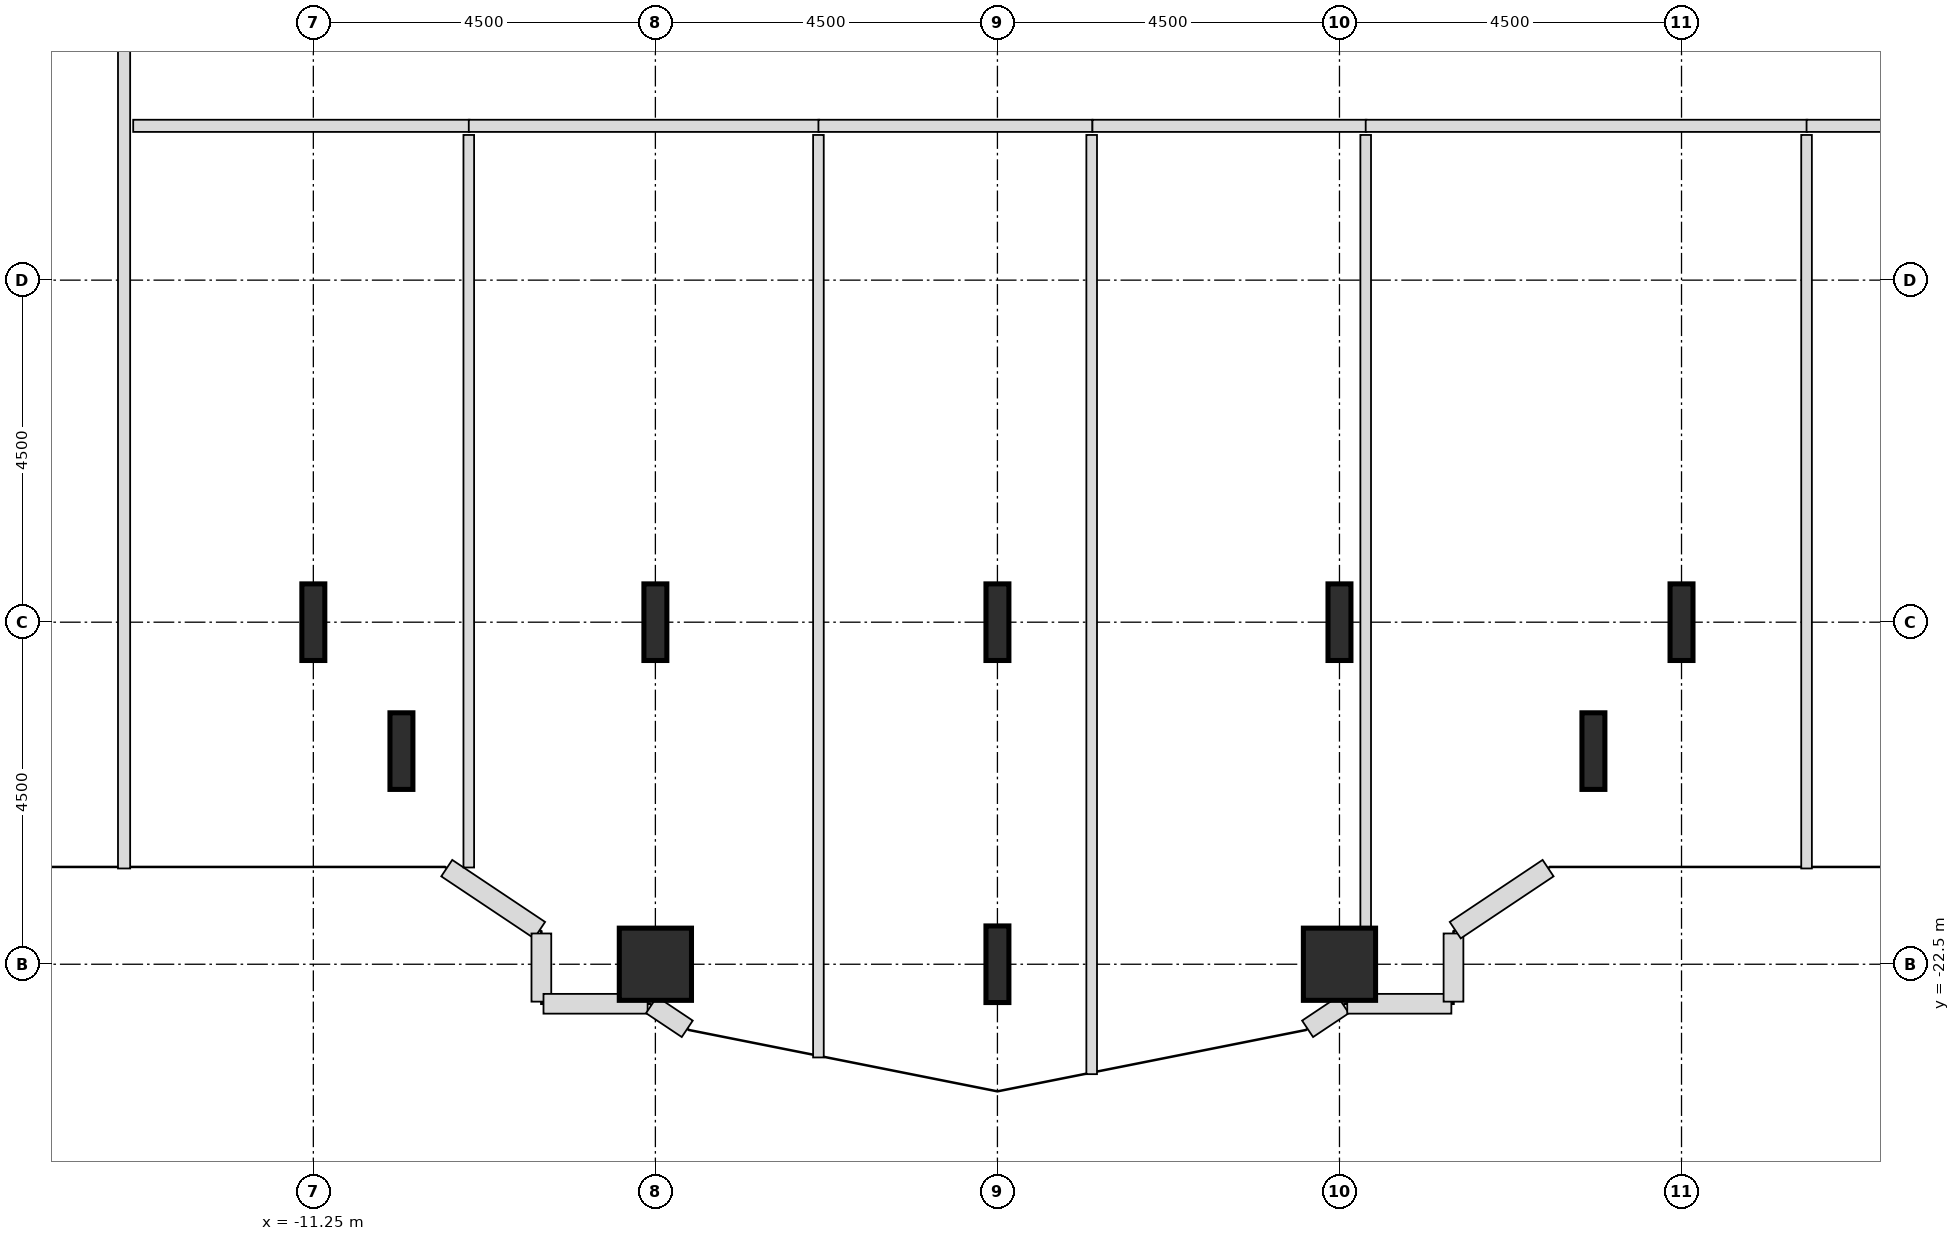
"""IFC4 building model, lengths in metres.
Left out: names, types, materials, properties, quantities, classifications, styles, units other than length and angle.
Written with IfcOpenShell. Run it as: python <this file> out.ifc"""

import sys

from ifc_helpers import new_model, si_unit, direction, frame, frame_2d, origin, origin_2d, place, context, subcontext, project, spatial, rectangle, hollow_rectangle, i_section, extrude, source, transform, mapped, element, fill, save


model = new_model("IFC4")
c1 = context("Model", 3, precision=1e-05, world=origin(), true_north=direction((0.0, 1.0)))
c2 = subcontext(c1, "Body", "Model", "MODEL_VIEW")
j1 = project(units=[si_unit("LENGTHUNIT", "METRE"), si_unit("PLANEANGLEUNIT", "RADIAN")], contexts=[c1])
p1 = place(None, origin())
s1 = spatial("IfcSite", under=j1, at=p1, CompositionType="ELEMENT")
p2 = place(p1, origin())
s2 = spatial("IfcBuilding", under=s1, at=p2, CompositionType="ELEMENT")
p3 = place(p2, frame((0.0, 0.0, 40.6)))
s3 = spatial("IfcBuildingStorey", under=s2, at=p3, CompositionType="ELEMENT", Elevation=40.6)
m1 = source(origin(), c2, "Body", "SweptSolid", [
    extrude(i_section(OverallWidth=0.302, OverallDepth=1.008, WebThickness=0.021, FlangeThickness=0.04, FilletRadius=0.03, at=origin_2d()), origin(), (0.0, 0.0, 1.0), 3.8),
])
for number, where, z_axis, x_axis in (
    (1, (-11.25, -18.0, 0.0), (0.0, 0.0, 1.0), (1.0, 0.0, 0.0)),
    (2, (-10.091, -19.696, 0.0), (0.0, 0.0, 1.0), (1.0, 0.0, 0.0)),
):
    element("IfcColumn", number, at=place(p3, frame(where, z_axis=z_axis, x_axis=x_axis)), inside=s3, PredefinedType="COLUMN", context=c2, shape_type="MappedRepresentation", body=[
        mapped(m1, transform((0.0, 0.0, 0.0), x_axis=(1.0, 0.0, 0.0), y_axis=(0.0, 1.0, 0.0), z_axis=(0.0, 0.0, 1.0), scale=1.0)),
    ])
m2 = source(origin(), c2, "Body", "SweptSolid", [
    extrude(hollow_rectangle(XDim=0.95, YDim=0.95, WallThickness=0.045, InnerFilletRadius=0.045, OuterFilletRadius=0.09, at=origin_2d()), origin(), (0.0, 0.0, 1.0), 3.8),
])
p4 = place(p3, frame((-6.75, -22.5, 0.0), z_axis=(0.0, 0.0, 1.0), x_axis=(1.0, 0.0, 0.0)))
e3 = element("IfcColumn", 3, at=p4, inside=s3, PredefinedType="COLUMN", context=c2, shape_type="MappedRepresentation", body=[
    mapped(m2, transform((0.0, 0.0, 0.0), x_axis=(1.0, 0.0, 0.0), y_axis=(0.0, 1.0, 0.0), z_axis=(0.0, 0.0, 1.0), scale=1.0)),
])
for number, where, z_axis, x_axis in (
    (4, (-6.75, -18.0, 0.0), (0.0, 0.0, 1.0), (1.0, 0.0, 0.0)),
    (5, (-2.25, -22.5, 0.0), (0.0, 0.0, 1.0), (1.0, 0.0, 0.0)),
    (6, (-2.25, -18.0, 0.0), (0.0, 0.0, 1.0), (1.0, 0.0, 0.0)),
):
    element("IfcColumn", number, at=place(p3, frame(where, z_axis=z_axis, x_axis=x_axis)), inside=s3, PredefinedType="COLUMN", context=c2, shape_type="MappedRepresentation", body=[
        mapped(m1, transform((0.0, 0.0, 0.0), x_axis=(1.0, 0.0, 0.0), y_axis=(0.0, 1.0, 0.0), z_axis=(0.0, 0.0, 1.0), scale=1.0)),
    ])
p5 = place(p3, frame((2.25, -22.5, 0.0), z_axis=(0.0, 0.0, 1.0), x_axis=(1.0, 0.0, 0.0)))
e7 = element("IfcColumn", 7, at=p5, inside=s3, PredefinedType="COLUMN", context=c2, shape_type="MappedRepresentation", body=[
    mapped(m2, transform((0.0, 0.0, 0.0), x_axis=(1.0, 0.0, 0.0), y_axis=(0.0, 1.0, 0.0), z_axis=(0.0, 0.0, 1.0), scale=1.0)),
])
for number, where, z_axis, x_axis in (
    (8, (2.25, -18.0, 0.0), (0.0, 0.0, 1.0), (1.0, 0.0, 0.0)),
    (9, (5.591, -19.696, 0.0), (0.0, 0.0, 1.0), (1.0, 0.0, 0.0)),
    (10, (6.75, -18.0, 0.0), (0.0, 0.0, 1.0), (1.0, 0.0, 0.0)),
):
    element("IfcColumn", number, at=place(p3, frame(where, z_axis=z_axis, x_axis=x_axis)), inside=s3, PredefinedType="COLUMN", context=c2, shape_type="MappedRepresentation", body=[
        mapped(m1, transform((0.0, 0.0, 0.0), x_axis=(1.0, 0.0, 0.0), y_axis=(0.0, 1.0, 0.0), z_axis=(0.0, 0.0, 1.0), scale=1.0)),
    ])
m3 = source(origin(), c2, "Body", "SweptSolid", [
    extrude(rectangle(XDim=1.469, YDim=0.26, at=frame_2d((0.734, 0.0))), origin(), (0.0, 0.0, 1.0), 3.55),
])
p6 = place(p3, frame((-9.495, -21.236, 0.0), z_axis=(0.0, 0.0, 1.0), x_axis=(0.831461760506, -0.555581983884, 0.0)))
e11 = element("IfcWall", 11, at=p6, inside=s3, PredefinedType="SOLIDWALL", context=c2, shape_type="MappedRepresentation", body=[
    mapped(m3, transform((0.0, 0.0, 0.0), x_axis=(1.0, 0.0, 0.0), y_axis=(0.0, 1.0, 0.0), z_axis=(0.0, 0.0, 1.0), scale=1.0)),
])
m4 = source(origin(), c2, "Body", "SweptSolid", [
    extrude(rectangle(XDim=0.897, YDim=0.26, at=frame_2d((0.448, 0.0))), origin(), (0.0, 0.0, 1.0), 3.55),
])
p7 = place(p3, frame((-8.25, -22.095, 0.0), z_axis=(0.0, 0.0, 1.0), x_axis=(0.0, -1.0, 0.0)))
e12 = element("IfcWall", 12, at=p7, inside=s3, PredefinedType="SOLIDWALL", context=c2, shape_type="MappedRepresentation", body=[
    mapped(m4, transform((0.0, 0.0, 0.0), x_axis=(1.0, 0.0, 0.0), y_axis=(0.0, 1.0, 0.0), z_axis=(0.0, 0.0, 1.0), scale=1.0)),
])
m5 = source(origin(), c2, "Body", "SweptSolid", [
    extrude(rectangle(XDim=1.37, YDim=0.26, at=frame_2d((0.685, 0.0))), origin(), (0.0, 0.0, 1.0), 3.55),
])
p8 = place(p3, frame((-8.222, -23.02, 0.0), z_axis=(0.0, 0.0, 1.0), x_axis=(1.0, 0.0, 0.0)))
e13 = element("IfcWall", 13, at=p8, inside=s3, PredefinedType="SOLIDWALL", context=c2, shape_type="MappedRepresentation", body=[
    mapped(m5, transform((0.0, 0.0, 0.0), x_axis=(1.0, 0.0, 0.0), y_axis=(0.0, 1.0, 0.0), z_axis=(0.0, 0.0, 1.0), scale=1.0)),
])
m6 = source(origin(), c2, "Body", "SweptSolid", [
    extrude(rectangle(XDim=0.565, YDim=0.26, at=frame_2d((0.283, 0.0))), origin(), (0.0, 0.0, 1.0), 3.55),
])
for number, where, z_axis, x_axis in (
    (14, (-6.801, -23.036, 0.0), (0.0, 0.0, 1.0), (0.832, -0.555, 0.0)),
    (15, (1.831, -23.35, 0.0), (0.0, 0.0, 1.0), (0.832, 0.555, 0.0)),
):
    element("IfcWall", number, at=place(p3, frame(where, z_axis=z_axis, x_axis=x_axis)), inside=s3, PredefinedType="SOLIDWALL", context=c2, shape_type="MappedRepresentation", body=[
        mapped(m6, transform((0.0, 0.0, 0.0), x_axis=(1.0, 0.0, 0.0), y_axis=(0.0, 1.0, 0.0), z_axis=(0.0, 0.0, 1.0), scale=1.0)),
    ])
p9 = place(p3, frame((2.352, -23.02, 0.0), z_axis=(0.0, 0.0, 1.0), x_axis=(1.0, 0.0, 0.0)))
e16 = element("IfcWall", 16, at=p9, inside=s3, PredefinedType="SOLIDWALL", context=c2, shape_type="MappedRepresentation", body=[
    mapped(m5, transform((0.0, 0.0, 0.0), x_axis=(1.0, 0.0, 0.0), y_axis=(0.0, 1.0, 0.0), z_axis=(0.0, 0.0, 1.0), scale=1.0)),
])
p10 = place(p3, frame((3.75, -22.992, 0.0), z_axis=(0.0, 0.0, 1.0), x_axis=(0.0, 1.0, 0.0)))
e17 = element("IfcWall", 17, at=p10, inside=s3, PredefinedType="SOLIDWALL", context=c2, shape_type="MappedRepresentation", body=[
    mapped(m4, transform((0.0, 0.0, 0.0), x_axis=(1.0, 0.0, 0.0), y_axis=(0.0, 1.0, 0.0), z_axis=(0.0, 0.0, 1.0), scale=1.0)),
])
p11 = place(p3, frame((3.773, -22.052, 0.0), z_axis=(0.0, 0.0, 1.0), x_axis=(0.831461760506, 0.555581983884, 0.0)))
e18 = element("IfcWall", 18, at=p11, inside=s3, PredefinedType="SOLIDWALL", context=c2, shape_type="MappedRepresentation", body=[
    mapped(m3, transform((0.0, 0.0, 0.0), x_axis=(1.0, 0.0, 0.0), y_axis=(0.0, 1.0, 0.0), z_axis=(0.0, 0.0, 1.0), scale=1.0)),
])
m7 = source(origin(), c2, "Body", "SweptSolid", [
    extrude(rectangle(XDim=13.045, YDim=0.16, at=frame_2d((6.522, 0.0))), origin(), (0.0, 0.0, 1.0), 3.535),
])
p12 = place(p3, frame((-13.74, -21.24, 0.0), z_axis=(0.0, 0.0, 1.0), x_axis=(0.0, 1.0, 0.0)))
e19 = element("IfcWall", 19, at=p12, inside=s3, PredefinedType="PARTITIONING", context=c2, shape_type="MappedRepresentation", body=[
    mapped(m7, transform((0.0, 0.0, 0.0), x_axis=(1.0, 0.0, 0.0), y_axis=(0.0, 1.0, 0.0), z_axis=(0.0, 0.0, 1.0), scale=1.0)),
])
p13 = place(p12, frame((10.913, 0.0, 0.0)))
e20 = element("IfcOpeningElement", 20, at=p13, cuts=e19, PredefinedType="OPENING", context=c2, shape_type="SweptSolid", body=[
    extrude(rectangle(XDim=0.95, YDim=2.1, at=frame_2d((0.475, 1.05))), frame((0.0, 0.09, 0.0), z_axis=(0.0, -1.0, 0.0), x_axis=(1.0, 0.0, 0.0)), (0.0, 0.0, 1.0), 0.18),
])
m8 = source(origin(), c2, "Body", "SweptSolid", [
    extrude(rectangle(XDim=4.425, YDim=0.16, at=frame_2d((2.212, 0.0))), origin(), (0.0, 0.0, 1.0), 3.535),
])
p14 = place(p3, frame((-13.62, -11.47, 0.0), z_axis=(0.0, 0.0, 1.0), x_axis=(1.0, 0.0, 0.0)))
e21 = element("IfcWall", 21, at=p14, inside=s3, PredefinedType="PARTITIONING", context=c2, shape_type="MappedRepresentation", body=[
    mapped(m8, transform((0.0, 0.0, 0.0), x_axis=(1.0, 0.0, 0.0), y_axis=(0.0, 1.0, 0.0), z_axis=(0.0, 0.0, 1.0), scale=1.0)),
])
p15 = place(p14, frame((1.738, 0.0, 0.0)))
e22 = element("IfcOpeningElement", 22, at=p15, cuts=e21, PredefinedType="OPENING", context=c2, shape_type="SweptSolid", body=[
    extrude(rectangle(XDim=0.95, YDim=2.1, at=frame_2d((0.475, 1.05))), frame((0.0, 0.09, 0.0), z_axis=(0.0, -1.0, 0.0), x_axis=(1.0, 0.0, 0.0)), (0.0, 0.0, 1.0), 0.18),
])
m9 = source(origin(), c2, "Body", "SweptSolid", [
    extrude(rectangle(XDim=9.637, YDim=0.14, at=frame_2d((4.818, 0.0))), origin(), (0.0, 0.0, 1.0), 3.535),
])
p16 = place(p3, frame((-9.205, -21.227, 0.0), z_axis=(0.0, 0.0, 1.0), x_axis=(0.0, 1.0, 0.0)))
e23 = element("IfcWall", 23, at=p16, inside=s3, PredefinedType="PARTITIONING", context=c2, shape_type="MappedRepresentation", body=[
    mapped(m9, transform((0.0, 0.0, 0.0), x_axis=(1.0, 0.0, 0.0), y_axis=(0.0, 1.0, 0.0), z_axis=(0.0, 0.0, 1.0), scale=1.0)),
])
m10 = source(origin(), c2, "Body", "SweptSolid", [
    extrude(rectangle(XDim=4.61, YDim=0.16, at=frame_2d((2.305, 0.0))), origin(), (0.0, 0.0, 1.0), 3.535),
])
p17 = place(p3, frame((-9.205, -11.47, 0.0), z_axis=(0.0, 0.0, 1.0), x_axis=(1.0, 0.0, 0.0)))
e24 = element("IfcWall", 24, at=p17, inside=s3, PredefinedType="PARTITIONING", context=c2, shape_type="MappedRepresentation", body=[
    mapped(m10, transform((0.0, 0.0, 0.0), x_axis=(1.0, 0.0, 0.0), y_axis=(0.0, 1.0, 0.0), z_axis=(0.0, 0.0, 1.0), scale=1.0)),
])
p18 = place(p17, frame((1.83, 0.0, 0.0)))
e25 = element("IfcOpeningElement", 25, at=p18, cuts=e24, PredefinedType="OPENING", context=c2, shape_type="SweptSolid", body=[
    extrude(rectangle(XDim=0.95, YDim=2.1, at=frame_2d((0.475, 1.05))), frame((0.0, 0.09, 0.0), z_axis=(0.0, -1.0, 0.0), x_axis=(1.0, 0.0, 0.0)), (0.0, 0.0, 1.0), 0.18),
])
m11 = source(origin(), c2, "Body", "SweptSolid", [
    extrude(rectangle(XDim=12.136, YDim=0.14, at=frame_2d((6.068, 0.0))), origin(), (0.0, 0.0, 1.0), 3.535),
])
p19 = place(p3, frame((-4.605, -23.726, 0.0), z_axis=(0.0, 0.0, 1.0), x_axis=(0.0, 1.0, 0.0)))
e26 = element("IfcWall", 26, at=p19, inside=s3, PredefinedType="PARTITIONING", context=c2, shape_type="MappedRepresentation", body=[
    mapped(m11, transform((0.0, 0.0, 0.0), x_axis=(1.0, 0.0, 0.0), y_axis=(0.0, 1.0, 0.0), z_axis=(0.0, 0.0, 1.0), scale=1.0)),
])
m12 = source(origin(), c2, "Body", "SweptSolid", [
    extrude(rectangle(XDim=3.605, YDim=0.16, at=frame_2d((1.802, 0.0))), origin(), (0.0, 0.0, 1.0), 3.535),
])
p20 = place(p3, frame((-4.605, -11.47, 0.0), z_axis=(0.0, 0.0, 1.0), x_axis=(1.0, 0.0, 0.0)))
e27 = element("IfcWall", 27, at=p20, inside=s3, PredefinedType="PARTITIONING", context=c2, shape_type="MappedRepresentation", body=[
    mapped(m12, transform((0.0, 0.0, 0.0), x_axis=(1.0, 0.0, 0.0), y_axis=(0.0, 1.0, 0.0), z_axis=(0.0, 0.0, 1.0), scale=1.0)),
])
p21 = place(p20, frame((1.327, 0.0, 0.0)))
e28 = element("IfcOpeningElement", 28, at=p21, cuts=e27, PredefinedType="OPENING", context=c2, shape_type="SweptSolid", body=[
    extrude(rectangle(XDim=0.95, YDim=2.1, at=frame_2d((0.475, 1.05))), frame((0.0, 0.09, 0.0), z_axis=(0.0, -1.0, 0.0), x_axis=(1.0, 0.0, 0.0)), (0.0, 0.0, 1.0), 0.18),
])
m13 = source(origin(), c2, "Body", "SweptSolid", [
    extrude(rectangle(XDim=12.356, YDim=0.14, at=frame_2d((6.178, 0.0))), origin(), (0.0, 0.0, 1.0), 3.535),
])
p22 = place(p3, frame((-1.01, -23.946, 0.0), z_axis=(0.0, 0.0, 1.0), x_axis=(0.0, 1.0, 0.0)))
e29 = element("IfcWall", 29, at=p22, inside=s3, PredefinedType="PARTITIONING", context=c2, shape_type="MappedRepresentation", body=[
    mapped(m13, transform((0.0, 0.0, 0.0), x_axis=(1.0, 0.0, 0.0), y_axis=(0.0, 1.0, 0.0), z_axis=(0.0, 0.0, 1.0), scale=1.0)),
])
p23 = place(p3, frame((-1.0, -11.47, 0.0), z_axis=(0.0, 0.0, 1.0), x_axis=(1.0, 0.0, 0.0)))
e30 = element("IfcWall", 30, at=p23, inside=s3, PredefinedType="PARTITIONING", context=c2, shape_type="MappedRepresentation", body=[
    mapped(m12, transform((0.0, 0.0, 0.0), x_axis=(1.0, 0.0, 0.0), y_axis=(0.0, 1.0, 0.0), z_axis=(0.0, 0.0, 1.0), scale=1.0)),
])
p24 = place(p23, frame((1.327, 0.0, 0.0)))
e31 = element("IfcOpeningElement", 31, at=p24, cuts=e30, PredefinedType="OPENING", context=c2, shape_type="SweptSolid", body=[
    extrude(rectangle(XDim=0.95, YDim=2.1, at=frame_2d((0.475, 1.05))), frame((0.0, 0.09, 0.0), z_axis=(0.0, -1.0, 0.0), x_axis=(1.0, 0.0, 0.0)), (0.0, 0.0, 1.0), 0.18),
])
m14 = source(origin(), c2, "Body", "SweptSolid", [
    extrude(rectangle(XDim=11.26, YDim=0.14, at=frame_2d((5.63, 0.0))), origin(), (0.0, 0.0, 1.0), 2.825),
])
p25 = place(p3, frame((2.595, -22.85, 0.0), z_axis=(0.0, 0.0, 1.0), x_axis=(0.0, 1.0, 0.0)))
e32 = element("IfcWall", 32, at=p25, inside=s3, PredefinedType="PARTITIONING", context=c2, shape_type="MappedRepresentation", body=[
    mapped(m14, transform((0.0, 0.0, 0.0), x_axis=(1.0, 0.0, 0.0), y_axis=(0.0, 1.0, 0.0), z_axis=(0.0, 0.0, 1.0), scale=1.0)),
])
m15 = source(origin(), c2, "Body", "SweptSolid", [
    extrude(rectangle(XDim=5.81, YDim=0.16, at=frame_2d((2.905, 0.0))), origin(), (0.0, 0.0, 1.0), 3.535),
])
p26 = place(p3, frame((2.595, -11.47, 0.0), z_axis=(0.0, 0.0, 1.0), x_axis=(1.0, 0.0, 0.0)))
e33 = element("IfcWall", 33, at=p26, inside=s3, PredefinedType="PARTITIONING", context=c2, shape_type="MappedRepresentation", body=[
    mapped(m15, transform((0.0, 0.0, 0.0), x_axis=(1.0, 0.0, 0.0), y_axis=(0.0, 1.0, 0.0), z_axis=(0.0, 0.0, 1.0), scale=1.0)),
])
p27 = place(p26, frame((2.43, 0.0, 0.0)))
e34 = element("IfcOpeningElement", 34, at=p27, cuts=e33, PredefinedType="OPENING", context=c2, shape_type="SweptSolid", body=[
    extrude(rectangle(XDim=0.95, YDim=2.1, at=frame_2d((0.475, 1.05))), frame((0.0, 0.09, 0.0), z_axis=(0.0, -1.0, 0.0), x_axis=(1.0, 0.0, 0.0)), (0.0, 0.0, 1.0), 0.18),
])
m16 = source(origin(), c2, "Body", "SweptSolid", [
    extrude(rectangle(XDim=9.65, YDim=0.14, at=frame_2d((4.825, 0.0))), origin(), (0.0, 0.0, 1.0), 3.535),
])
p28 = place(p3, frame((8.395, -21.24, 0.0), z_axis=(0.0, 0.0, 1.0), x_axis=(0.0, 1.0, 0.0)))
e35 = element("IfcWall", 35, at=p28, inside=s3, PredefinedType="PARTITIONING", context=c2, shape_type="MappedRepresentation", body=[
    mapped(m16, transform((0.0, 0.0, 0.0), x_axis=(1.0, 0.0, 0.0), y_axis=(0.0, 1.0, 0.0), z_axis=(0.0, 0.0, 1.0), scale=1.0)),
])
m17 = source(origin(), c2, "Body", "SweptSolid", [
    extrude(rectangle(XDim=5.225, YDim=0.16, at=frame_2d((2.613, 0.0))), origin(), (0.0, 0.0, 1.0), 3.535),
])
p29 = place(p3, frame((8.395, -11.47, 0.0), z_axis=(0.0, 0.0, 1.0), x_axis=(1.0, 0.0, 0.0)))
e36 = element("IfcWall", 36, at=p29, inside=s3, PredefinedType="PARTITIONING", context=c2, shape_type="MappedRepresentation", body=[
    mapped(m17, transform((0.0, 0.0, 0.0), x_axis=(1.0, 0.0, 0.0), y_axis=(0.0, 1.0, 0.0), z_axis=(0.0, 0.0, 1.0), scale=1.0)),
])
p30 = place(p29, frame((2.137, 0.0, 0.0)))
e37 = element("IfcOpeningElement", 37, at=p30, cuts=e36, PredefinedType="OPENING", context=c2, shape_type="SweptSolid", body=[
    extrude(rectangle(XDim=0.95, YDim=2.1, at=frame_2d((0.475, 1.05))), frame((0.0, 0.09, 0.0), z_axis=(0.0, -1.0, 0.0), x_axis=(1.0, 0.0, 0.0)), (0.0, 0.0, 1.0), 0.18),
])
m18 = source(origin(), c2, "Body", "SweptSolid", [
    extrude(rectangle(XDim=0.95, YDim=2.1, at=frame_2d((0.475, 1.05))), frame((0.0, 0.025, 0.0), z_axis=(0.0, -1.0, 0.0), x_axis=(1.0, 0.0, 0.0)), (0.0, 0.0, 1.0), 0.05),
])
p31 = place(p15, origin())
e38 = element("IfcDoor", 38, at=p31, inside=s3, OperationType="SINGLE_SWING_RIGHT", PredefinedType="DOOR", context=c2, shape_type="MappedRepresentation", body=[
    mapped(m18, transform((0.0, 0.0, 0.0), x_axis=(1.0, 0.0, 0.0), y_axis=(0.0, 1.0, 0.0), z_axis=(0.0, 0.0, 1.0), scale=1.0)),
])
fill(e22, e38)
p32 = place(p18, origin())
e39 = element("IfcDoor", 39, at=p32, inside=s3, OperationType="SINGLE_SWING_LEFT", PredefinedType="DOOR", context=c2, shape_type="MappedRepresentation", body=[
    mapped(m18, transform((0.0, 0.0, 0.0), x_axis=(1.0, 0.0, 0.0), y_axis=(0.0, 1.0, 0.0), z_axis=(0.0, 0.0, 1.0), scale=1.0)),
])
fill(e25, e39)
p33 = place(p21, origin())
e40 = element("IfcDoor", 40, at=p33, inside=s3, OperationType="SINGLE_SWING_RIGHT", PredefinedType="DOOR", context=c2, shape_type="MappedRepresentation", body=[
    mapped(m18, transform((0.0, 0.0, 0.0), x_axis=(1.0, 0.0, 0.0), y_axis=(0.0, 1.0, 0.0), z_axis=(0.0, 0.0, 1.0), scale=1.0)),
])
fill(e28, e40)
p34 = place(p24, origin())
e41 = element("IfcDoor", 41, at=p34, inside=s3, OperationType="SINGLE_SWING_LEFT", PredefinedType="DOOR", context=c2, shape_type="MappedRepresentation", body=[
    mapped(m18, transform((0.0, 0.0, 0.0), x_axis=(1.0, 0.0, 0.0), y_axis=(0.0, 1.0, 0.0), z_axis=(0.0, 0.0, 1.0), scale=1.0)),
])
fill(e31, e41)
p35 = place(p27, origin())
e42 = element("IfcDoor", 42, at=p35, inside=s3, OperationType="SINGLE_SWING_RIGHT", PredefinedType="DOOR", context=c2, shape_type="MappedRepresentation", body=[
    mapped(m18, transform((0.0, 0.0, 0.0), x_axis=(1.0, 0.0, 0.0), y_axis=(0.0, 1.0, 0.0), z_axis=(0.0, 0.0, 1.0), scale=1.0)),
])
fill(e34, e42)
save(model, sys.argv[1])
